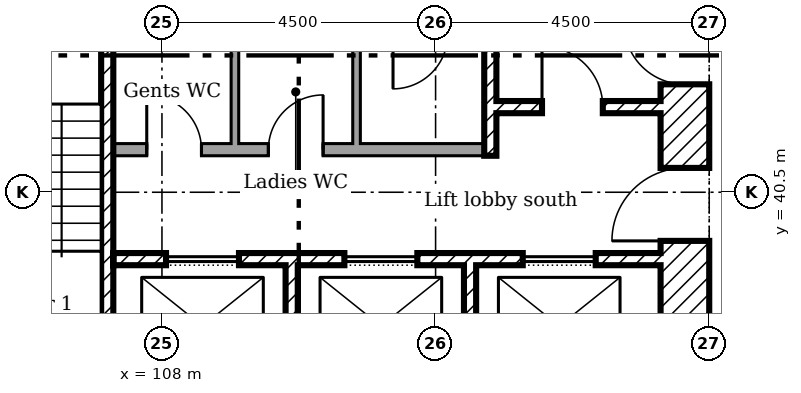
"""IFC4 building model, lengths in metres.
Left out: names, types, materials, properties, quantities, classifications, styles, units other than length and angle.
Written with IfcOpenShell. Run it as: python <this file> out.ifc"""

import sys

from ifc_helpers import new_model, si_unit, direction, frame, frame_2d, origin, place, context, subcontext, project, spatial, rectangle, extrude, element, fill, save


model = new_model("IFC4")
c1 = context("Model", 3, precision=1e-05, world=origin(), true_north=direction((0.0, 1.0)))
c2 = subcontext(c1, "Body", "Model", "MODEL_VIEW")
j1 = project(units=[si_unit("LENGTHUNIT", "METRE"), si_unit("PLANEANGLEUNIT", "RADIAN")], contexts=[c1])
p1 = place(None, origin())
s1 = spatial("IfcSite", under=j1, at=p1, CompositionType="ELEMENT")
p2 = place(p1, origin())
s2 = spatial("IfcBuilding", under=s1, at=p2, CompositionType="ELEMENT")
p3 = place(p2, frame((0.0, 0.0, 51.0)))
s3 = spatial("IfcBuildingStorey", under=s2, at=p3, CompositionType="ELEMENT", Elevation=51.0)
p4 = place(p3, frame((116.6, 36.0, 0.0), z_axis=(0.0, 0.0, 1.0), x_axis=(0.0, 1.0, 0.0)))
e1 = element("IfcWall", 1, at=p4, inside=s3, PredefinedType="SHEAR", context=c2, shape_type="SweptSolid", body=[
    extrude(rectangle(XDim=13.5, YDim=0.8, at=frame_2d((6.75, 0.0))), origin(), (0.0, 0.0, 1.0), 3.35),
])
p5 = place(p4, frame((3.7, 0.0, 0.0)))
e2 = element("IfcOpeningElement", 2, at=p5, cuts=e1, PredefinedType="OPENING", context=c2, shape_type="SweptSolid", body=[
    extrude(rectangle(XDim=1.2, YDim=2.1, at=frame_2d((0.6, 1.05))), frame((0.0, 0.41, 0.0), z_axis=(0.0, -1.0, 0.0), x_axis=(1.0, 0.0, 0.0)), (0.0, 0.0, 1.0), 0.82),
])
p6 = place(p4, frame((6.275, 0.0, 0.0)))
e3 = element("IfcOpeningElement", 3, at=p6, cuts=e1, PredefinedType="OPENING", context=c2, shape_type="SweptSolid", body=[
    extrude(rectangle(XDim=1.0, YDim=2.1, at=frame_2d((0.5, 1.05))), frame((0.0, 0.41, 0.0), z_axis=(0.0, -1.0, 0.0), x_axis=(1.0, 0.0, 0.0)), (0.0, 0.0, 1.0), 0.82),
])
for number, where, z_axis, x_axis in (
    (4, (110.133, 36.8, 0.0), (0.0, 0.0, 1.0), (0.0, 1.0, 0.0)),
    (5, (113.067, 36.8, 0.0), (0.0, 0.0, 1.0), (0.0, 1.0, 0.0)),
):
    element("IfcWall", number, at=place(p3, frame(where, z_axis=z_axis, x_axis=x_axis)), inside=s3, PredefinedType="SHEAR", context=c2, shape_type="SweptSolid", body=[
        extrude(rectangle(XDim=2.5, YDim=0.2, at=frame_2d((1.25, 0.0))), origin(), (0.0, 0.0, 1.0), 3.35),
    ])
p7 = place(p3, frame((107.2, 39.4, 0.0)))
e6 = element("IfcWall", 6, at=p7, inside=s3, PredefinedType="SHEAR", context=c2, shape_type="SweptSolid", body=[
    extrude(rectangle(XDim=9.0, YDim=0.2, at=frame_2d((4.5, 0.0))), origin(), (0.0, 0.0, 1.0), 3.35),
])
p8 = place(p7, frame((0.867, 0.0, 0.0)))
e7 = element("IfcOpeningElement", 7, at=p8, cuts=e6, PredefinedType="OPENING", context=c2, shape_type="SweptSolid", body=[
    extrude(rectangle(XDim=1.2, YDim=2.1, at=frame_2d((0.6, 1.05))), frame((0.0, 0.11, 0.0), z_axis=(0.0, -1.0, 0.0), x_axis=(1.0, 0.0, 0.0)), (0.0, 0.0, 1.0), 0.22),
])
p9 = place(p7, frame((3.8, 0.0, 0.0)))
e8 = element("IfcOpeningElement", 8, at=p9, cuts=e6, PredefinedType="OPENING", context=c2, shape_type="SweptSolid", body=[
    extrude(rectangle(XDim=1.2, YDim=2.1, at=frame_2d((0.6, 1.05))), frame((0.0, 0.11, 0.0), z_axis=(0.0, -1.0, 0.0), x_axis=(1.0, 0.0, 0.0)), (0.0, 0.0, 1.0), 0.22),
])
p10 = place(p7, frame((6.733, 0.0, 0.0)))
e9 = element("IfcOpeningElement", 9, at=p10, cuts=e6, PredefinedType="OPENING", context=c2, shape_type="SweptSolid", body=[
    extrude(rectangle(XDim=1.2, YDim=2.1, at=frame_2d((0.6, 1.05))), frame((0.0, 0.11, 0.0), z_axis=(0.0, -1.0, 0.0), x_axis=(1.0, 0.0, 0.0)), (0.0, 0.0, 1.0), 0.22),
])
p11 = place(p3, frame((107.1, 36.8, 0.0), z_axis=(0.0, 0.0, 1.0), x_axis=(0.0, 1.0, 0.0)))
e10 = element("IfcWall", 10, at=p11, inside=s3, PredefinedType="SHEAR", context=c2, shape_type="SweptSolid", body=[
    extrude(rectangle(XDim=6.9, YDim=0.2, at=frame_2d((3.45, 0.0))), origin(), (0.0, 0.0, 1.0), 3.35),
])
p12 = place(p3, frame((113.5, 41.9, 0.0)))
e11 = element("IfcWall", 11, at=p12, inside=s3, PredefinedType="SHEAR", context=c2, shape_type="SweptSolid", body=[
    extrude(rectangle(XDim=2.7, YDim=0.2, at=frame_2d((1.35, 0.0))), origin(), (0.0, 0.0, 1.0), 3.35),
])
p13 = place(p12, frame((0.75, 0.0, 0.0)))
e12 = element("IfcOpeningElement", 12, at=p13, cuts=e11, PredefinedType="OPENING", context=c2, shape_type="SweptSolid", body=[
    extrude(rectangle(XDim=1.0, YDim=2.1, at=frame_2d((0.5, 1.05))), frame((0.0, 0.11, 0.0), z_axis=(0.0, -1.0, 0.0), x_axis=(1.0, 0.0, 0.0)), (0.0, 0.0, 1.0), 0.22),
])
p14 = place(p3, frame((113.4, 41.1, 0.0), z_axis=(0.0, 0.0, 1.0), x_axis=(0.0, 1.0, 0.0)))
e13 = element("IfcWall", 13, at=p14, inside=s3, PredefinedType="SHEAR", context=c2, shape_type="SweptSolid", body=[
    extrude(rectangle(XDim=7.6, YDim=0.2, at=frame_2d((3.8, 0.0))), origin(), (0.0, 0.0, 1.0), 3.35),
])
p15 = place(p3, frame((107.2, 41.2, 0.0)))
e14 = element("IfcWall", 14, at=p15, inside=s3, PredefinedType="PARTITIONING", context=c2, shape_type="SweptSolid", body=[
    extrude(rectangle(XDim=6.1, YDim=0.2, at=frame_2d((3.05, 0.0))), origin(), (0.0, 0.0, 1.0), 3.35),
])
p16 = place(p15, frame((0.55, 0.0, 0.0)))
e15 = element("IfcOpeningElement", 15, at=p16, cuts=e14, PredefinedType="OPENING", context=c2, shape_type="SweptSolid", body=[
    extrude(rectangle(XDim=0.9, YDim=2.1, at=frame_2d((0.45, 1.05))), frame((0.0, 0.11, 0.0), z_axis=(0.0, -1.0, 0.0), x_axis=(1.0, 0.0, 0.0)), (0.0, 0.0, 1.0), 0.22),
])
p17 = place(p15, frame((2.55, 0.0, 0.0)))
e16 = element("IfcOpeningElement", 16, at=p17, cuts=e14, PredefinedType="OPENING", context=c2, shape_type="SweptSolid", body=[
    extrude(rectangle(XDim=0.9, YDim=2.1, at=frame_2d((0.45, 1.05))), frame((0.0, 0.11, 0.0), z_axis=(0.0, -1.0, 0.0), x_axis=(1.0, 0.0, 0.0)), (0.0, 0.0, 1.0), 0.22),
])
for number, where, z_axis, x_axis in (
    (17, (109.2, 41.3, 0.0), (0.0, 0.0, 1.0), (0.0, 1.0, 0.0)),
    (18, (111.2, 41.3, 0.0), (0.0, 0.0, 1.0), (0.0, 1.0, 0.0)),
):
    element("IfcWall", number, at=place(p3, frame(where, z_axis=z_axis, x_axis=x_axis)), inside=s3, PredefinedType="PARTITIONING", context=c2, shape_type="SweptSolid", body=[
        extrude(rectangle(XDim=1.7, YDim=0.125, at=frame_2d((0.85, 0.0))), origin(), (0.0, 0.0, 1.0), 3.35),
    ])
p18 = place(p5, origin())
e19 = element("IfcDoor", 19, at=p18, inside=s3, OperationType="SINGLE_SWING_RIGHT", PredefinedType="DOOR", context=c2, shape_type="SweptSolid", body=[
    extrude(rectangle(XDim=1.2, YDim=2.1, at=frame_2d((0.6, 1.05))), frame((0.0, 0.025, 0.0), z_axis=(0.0, -1.0, 0.0), x_axis=(1.0, 0.0, 0.0)), (0.0, 0.0, 1.0), 0.05),
])
fill(e2, e19)
p19 = place(p13, origin())
e20 = element("IfcDoor", 20, at=p19, inside=s3, OperationType="SINGLE_SWING_RIGHT", PredefinedType="DOOR", context=c2, shape_type="SweptSolid", body=[
    extrude(rectangle(XDim=1.0, YDim=2.1, at=frame_2d((0.5, 1.05))), frame((0.0, 0.025, 0.0), z_axis=(0.0, -1.0, 0.0), x_axis=(1.0, 0.0, 0.0)), (0.0, 0.0, 1.0), 0.05),
])
fill(e12, e20)
p20 = place(p6, origin())
e21 = element("IfcDoor", 21, at=p20, inside=s3, OperationType="SINGLE_SWING_LEFT", PredefinedType="DOOR", context=c2, shape_type="SweptSolid", body=[
    extrude(rectangle(XDim=1.0, YDim=2.1, at=frame_2d((0.5, 1.05))), frame((0.0, 0.025, 0.0), z_axis=(0.0, -1.0, 0.0), x_axis=(1.0, 0.0, 0.0)), (0.0, 0.0, 1.0), 0.05),
])
fill(e3, e21)
p21 = place(p16, origin())
e22 = element("IfcDoor", 22, at=p21, inside=s3, OperationType="SINGLE_SWING_RIGHT", PredefinedType="DOOR", context=c2, shape_type="SweptSolid", body=[
    extrude(rectangle(XDim=0.9, YDim=2.1, at=frame_2d((0.45, 1.05))), frame((0.0, 0.025, 0.0), z_axis=(0.0, -1.0, 0.0), x_axis=(1.0, 0.0, 0.0)), (0.0, 0.0, 1.0), 0.05),
])
fill(e15, e22)
p22 = place(p17, origin())
e23 = element("IfcDoor", 23, at=p22, inside=s3, OperationType="SINGLE_SWING_LEFT", PredefinedType="DOOR", context=c2, shape_type="SweptSolid", body=[
    extrude(rectangle(XDim=0.9, YDim=2.1, at=frame_2d((0.45, 1.05))), frame((0.0, 0.025, 0.0), z_axis=(0.0, -1.0, 0.0), x_axis=(1.0, 0.0, 0.0)), (0.0, 0.0, 1.0), 0.05),
])
fill(e16, e23)
p23 = place(p8, origin())
e24 = element("IfcDoor", 24, at=p23, inside=s3, OperationType="SLIDING_TO_LEFT", PredefinedType="DOOR", context=c2, shape_type="SweptSolid", body=[
    extrude(rectangle(XDim=1.2, YDim=2.1, at=frame_2d((0.6, 1.05))), frame((0.0, 0.025, 0.0), z_axis=(0.0, -1.0, 0.0), x_axis=(1.0, 0.0, 0.0)), (0.0, 0.0, 1.0), 0.05),
])
fill(e7, e24)
p24 = place(p9, origin())
e25 = element("IfcDoor", 25, at=p24, inside=s3, OperationType="SLIDING_TO_LEFT", PredefinedType="DOOR", context=c2, shape_type="SweptSolid", body=[
    extrude(rectangle(XDim=1.2, YDim=2.1, at=frame_2d((0.6, 1.05))), frame((0.0, 0.025, 0.0), z_axis=(0.0, -1.0, 0.0), x_axis=(1.0, 0.0, 0.0)), (0.0, 0.0, 1.0), 0.05),
])
fill(e8, e25)
p25 = place(p10, origin())
e26 = element("IfcDoor", 26, at=p25, inside=s3, OperationType="SLIDING_TO_LEFT", PredefinedType="DOOR", context=c2, shape_type="SweptSolid", body=[
    extrude(rectangle(XDim=1.2, YDim=2.1, at=frame_2d((0.6, 1.05))), frame((0.0, 0.025, 0.0), z_axis=(0.0, -1.0, 0.0), x_axis=(1.0, 0.0, 0.0)), (0.0, 0.0, 1.0), 0.05),
])
fill(e9, e26)
save(model, sys.argv[1])
